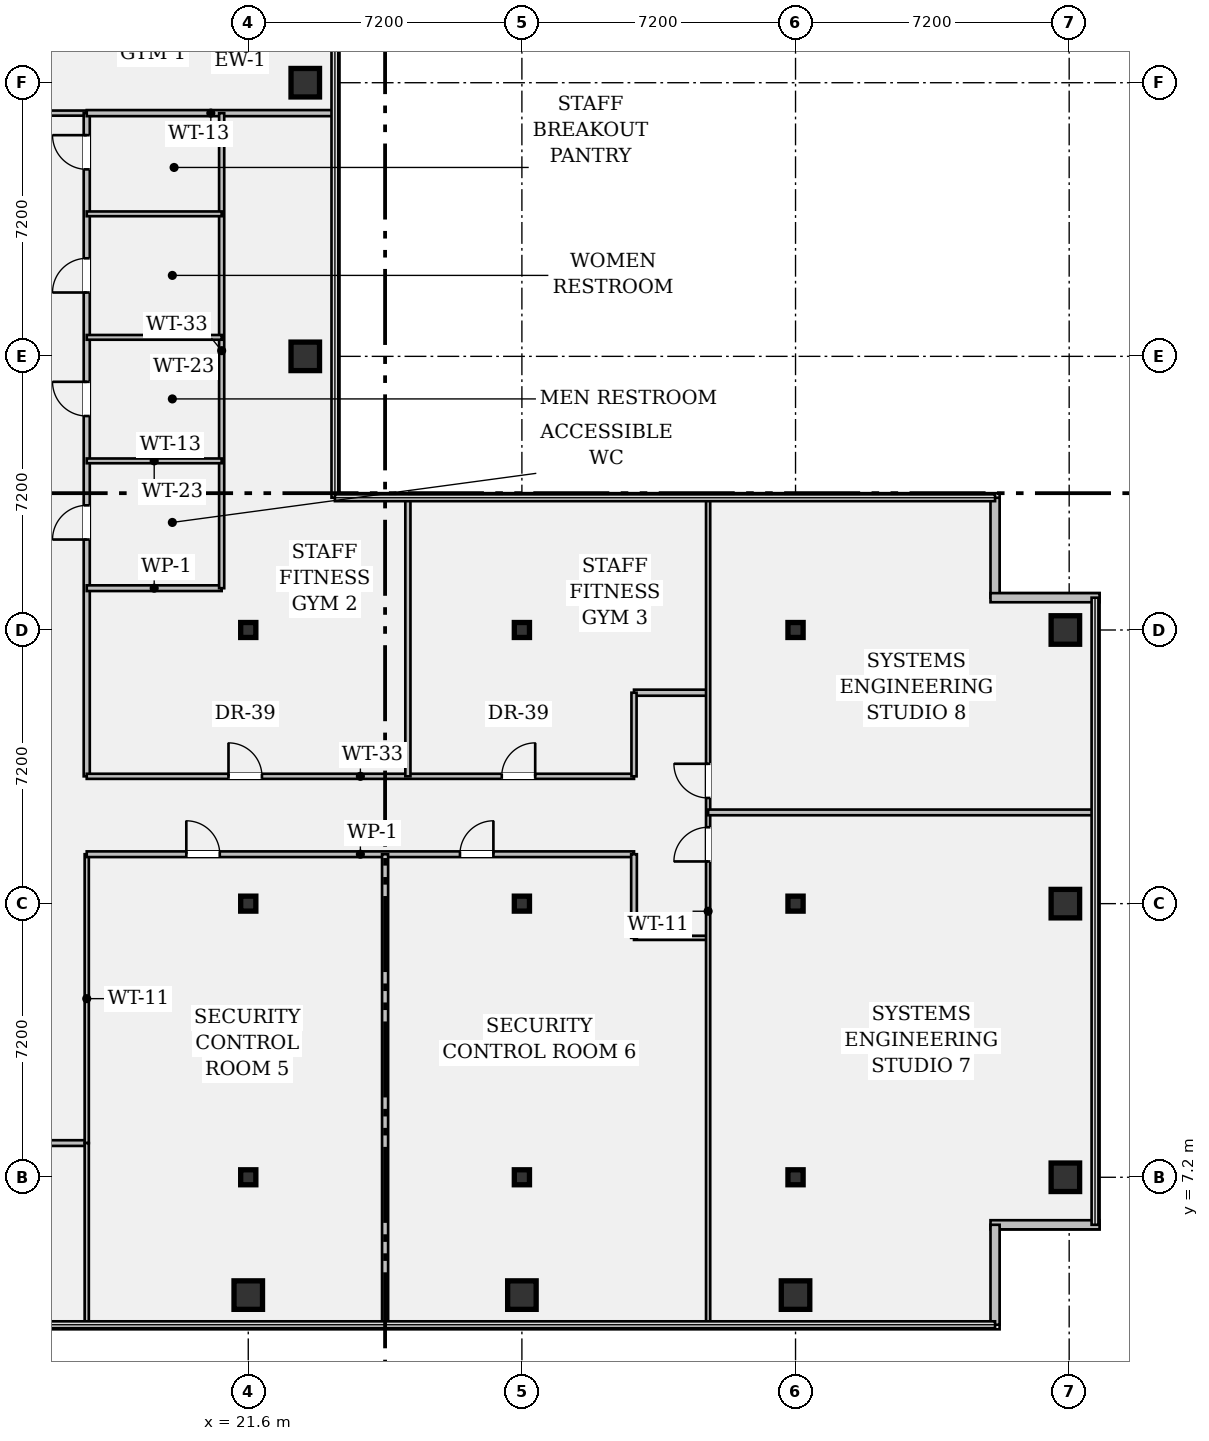
"""IFC4 building model, lengths in metres.
Left out: names, types, materials, properties, quantities, classifications, styles, units other than length and angle.
Written with IfcOpenShell. Run it as: python <this file> out.ifc"""

import sys

from ifc_helpers import new_model, si_unit, direction, frame, frame_2d, origin, origin_2d, place, context, subcontext, project, spatial, rectangle, hollow_rectangle, i_section, extrude, element, fill, save


model = new_model("IFC4")
c1 = context("Model", 3, precision=1e-05, world=origin(), true_north=direction((0.0, 1.0)))
c2 = subcontext(c1, "Body", "Model", "MODEL_VIEW")
j1 = project(units=[si_unit("LENGTHUNIT", "METRE"), si_unit("PLANEANGLEUNIT", "RADIAN")], contexts=[c1])
p1 = place(None, origin())
s1 = spatial("IfcSite", under=j1, at=p1, CompositionType="ELEMENT")
p2 = place(p1, origin())
s2 = spatial("IfcBuilding", under=s1, at=p2, CompositionType="ELEMENT")
p3 = place(p2, frame((0.0, 0.0, 211.75)))
s3 = spatial("IfcBuildingStorey", under=s2, at=p3, CompositionType="ELEMENT", Elevation=211.75)
p4 = place(p3, frame((21.6, 4.1, 0.0), z_axis=(0.0, 0.0, 1.0), x_axis=(1.0, 0.0, 0.0)))
e1 = element("IfcColumn", 1, at=p4, inside=s3, PredefinedType="COLUMN", context=c2, shape_type="SweptSolid", body=[
    extrude(hollow_rectangle(XDim=0.75, YDim=0.75, WallThickness=0.045, at=origin_2d()), origin(), (0.0, 0.0, 1.0), 3.24),
])
for number, where, z_axis, x_axis in (
    (2, (21.6, 7.2, 0.0), (0.0, 0.0, 1.0), (1.0, 0.0, 0.0)),
    (3, (21.6, 14.4, 0.0), (0.0, 0.0, 1.0), (1.0, 0.0, 0.0)),
    (4, (21.6, 21.6, 0.0), (0.0, 0.0, 1.0), (1.0, 0.0, 0.0)),
):
    element("IfcColumn", number, at=place(p3, frame(where, z_axis=z_axis, x_axis=x_axis)), inside=s3, PredefinedType="COLUMN", context=c2, shape_type="SweptSolid", body=[
        extrude(i_section(OverallWidth=0.399, OverallDepth=0.394, WebThickness=0.023, FlangeThickness=0.037, FilletRadius=0.018, at=origin_2d()), origin(), (0.0, 0.0, 1.0), 3.24),
    ])
for number, where, z_axis, x_axis in (
    (5, (23.1, 28.8, 0.0), (0.0, 0.0, 1.0), (1.0, 0.0, 0.0)),
    (6, (23.1, 36.0, 0.0), (0.0, 0.0, 1.0), (1.0, 0.0, 0.0)),
    (7, (28.8, 4.1, 0.0), (0.0, 0.0, 1.0), (1.0, 0.0, 0.0)),
):
    element("IfcColumn", number, at=place(p3, frame(where, z_axis=z_axis, x_axis=x_axis)), inside=s3, PredefinedType="COLUMN", context=c2, shape_type="SweptSolid", body=[
        extrude(hollow_rectangle(XDim=0.75, YDim=0.75, WallThickness=0.045, at=origin_2d()), origin(), (0.0, 0.0, 1.0), 3.24),
    ])
for number, where, z_axis, x_axis in (
    (8, (28.8, 7.2, 0.0), (0.0, 0.0, 1.0), (1.0, 0.0, 0.0)),
    (9, (28.8, 14.4, 0.0), (0.0, 0.0, 1.0), (1.0, 0.0, 0.0)),
    (10, (28.8, 21.6, 0.0), (0.0, 0.0, 1.0), (1.0, 0.0, 0.0)),
):
    element("IfcColumn", number, at=place(p3, frame(where, z_axis=z_axis, x_axis=x_axis)), inside=s3, PredefinedType="COLUMN", context=c2, shape_type="SweptSolid", body=[
        extrude(i_section(OverallWidth=0.399, OverallDepth=0.394, WebThickness=0.023, FlangeThickness=0.037, FilletRadius=0.018, at=origin_2d()), origin(), (0.0, 0.0, 1.0), 3.24),
    ])
p5 = place(p3, frame((36.0, 4.1, 0.0), z_axis=(0.0, 0.0, 1.0), x_axis=(1.0, 0.0, 0.0)))
e11 = element("IfcColumn", 11, at=p5, inside=s3, PredefinedType="COLUMN", context=c2, shape_type="SweptSolid", body=[
    extrude(hollow_rectangle(XDim=0.75, YDim=0.75, WallThickness=0.045, at=origin_2d()), origin(), (0.0, 0.0, 1.0), 3.24),
])
for number, where, z_axis, x_axis in (
    (12, (36.0, 7.2, 0.0), (0.0, 0.0, 1.0), (1.0, 0.0, 0.0)),
    (13, (36.0, 14.4, 0.0), (0.0, 0.0, 1.0), (1.0, 0.0, 0.0)),
    (14, (36.0, 21.6, 0.0), (0.0, 0.0, 1.0), (1.0, 0.0, 0.0)),
):
    element("IfcColumn", number, at=place(p3, frame(where, z_axis=z_axis, x_axis=x_axis)), inside=s3, PredefinedType="COLUMN", context=c2, shape_type="SweptSolid", body=[
        extrude(i_section(OverallWidth=0.399, OverallDepth=0.394, WebThickness=0.023, FlangeThickness=0.037, FilletRadius=0.018, at=origin_2d()), origin(), (0.0, 0.0, 1.0), 3.24),
    ])
for number, where, z_axis, x_axis in (
    (15, (43.1, 7.2, 0.0), (0.0, 0.0, 1.0), (1.0, 0.0, 0.0)),
    (16, (43.1, 14.4, 0.0), (0.0, 0.0, 1.0), (1.0, 0.0, 0.0)),
    (17, (43.1, 21.6, 0.0), (0.0, 0.0, 1.0), (1.0, 0.0, 0.0)),
):
    element("IfcColumn", number, at=place(p3, frame(where, z_axis=z_axis, x_axis=x_axis)), inside=s3, PredefinedType="COLUMN", context=c2, shape_type="SweptSolid", body=[
        extrude(hollow_rectangle(XDim=0.75, YDim=0.75, WallThickness=0.045, at=origin_2d()), origin(), (0.0, 0.0, 1.0), 3.24),
    ])
p6 = place(p3, frame((41.25, 25.08, 0.0), z_axis=(0.0, 0.0, 1.0), x_axis=(0.0, -1.0, 0.0)))
e18 = element("IfcWall", 18, at=p6, inside=s3, PredefinedType="STANDARD", context=c2, shape_type="SweptSolid", body=[
    extrude(rectangle(XDim=2.63, YDim=0.24, at=frame_2d((1.315, 0.0))), origin(), (0.0, 0.0, 1.0), 3.24),
])
for number, where, z_axis, x_axis in (
    (19, (41.13, 22.45, 0.0), (0.0, 0.0, 1.0), (1.0, 0.0, 0.0)),
    (20, (44.0, 5.95, 0.0), (0.0, 0.0, 1.0), (-1.0, 0.0, 0.0)),
):
    element("IfcWall", number, at=place(p3, frame(where, z_axis=z_axis, x_axis=x_axis)), inside=s3, PredefinedType="STANDARD", context=c2, shape_type="SweptSolid", body=[
        extrude(rectangle(XDim=2.87, YDim=0.24, at=frame_2d((1.435, 0.0))), origin(), (0.0, 0.0, 1.0), 3.24),
    ])
p7 = place(p3, frame((41.25, 5.95, 0.0), z_axis=(0.0, 0.0, 1.0), x_axis=(0.0, -1.0, 0.0)))
e21 = element("IfcWall", 21, at=p7, inside=s3, PredefinedType="STANDARD", context=c2, shape_type="SweptSolid", body=[
    extrude(rectangle(XDim=2.63, YDim=0.24, at=frame_2d((1.315, 0.0))), origin(), (0.0, 0.0, 1.0), 3.24),
])
p8 = place(p3, frame((14.4, 8.1, 0.0), z_axis=(0.0, 0.0, 1.0), x_axis=(1.0, 0.0, 0.0)))
e22 = element("IfcWall", 22, at=p8, inside=s3, PredefinedType="PARTITIONING", context=c2, shape_type="SweptSolid", body=[
    extrude(rectangle(XDim=2.95, YDim=0.15, at=frame_2d((1.475, 0.0))), origin(), (0.0, 0.0, 1.0), 2.808),
])
p9 = place(p8, frame((0.95, 0.0, 0.0)))
e23 = element("IfcOpeningElement", 23, at=p9, cuts=e22, PredefinedType="OPENING", context=c2, shape_type="SweptSolid", body=[
    extrude(rectangle(XDim=0.88, YDim=2.15, at=frame_2d((0.44, 1.075))), frame((0.0, 0.087, 0.0), z_axis=(0.0, -1.0, 0.0), x_axis=(1.0, 0.0, 0.0)), (0.0, 0.0, 1.0), 0.174),
])
p10 = place(p3, frame((14.4, 35.2, 0.0), z_axis=(0.0, 0.0, 1.0), x_axis=(1.0, 0.0, 0.0)))
e24 = element("IfcWall", 24, at=p10, inside=s3, PredefinedType="PARTITIONING", context=c2, shape_type="SweptSolid", body=[
    extrude(rectangle(XDim=2.95, YDim=0.135, at=frame_2d((1.475, 0.0))), origin(), (0.0, 0.0, 1.0), 2.808),
])
p11 = place(p10, frame((0.95, 0.0, 0.0)))
e25 = element("IfcOpeningElement", 25, at=p11, cuts=e24, PredefinedType="OPENING", context=c2, shape_type="SweptSolid", body=[
    extrude(rectangle(XDim=1.0, YDim=2.15, at=frame_2d((0.5, 1.075))), frame((0.0, 0.08, 0.0), z_axis=(0.0, -1.0, 0.0), x_axis=(1.0, 0.0, 0.0)), (0.0, 0.0, 1.0), 0.159),
])
p12 = place(p3, frame((17.35, 8.1, 0.0), z_axis=(0.0, 0.0, 1.0), x_axis=(0.0, 1.0, 0.0)))
e26 = element("IfcWall", 26, at=p12, inside=s3, PredefinedType="PARTITIONING", context=c2, shape_type="SweptSolid", body=[
    extrude(rectangle(XDim=7.6, YDim=0.11, at=frame_2d((3.8, 0.0))), origin(), (0.0, 0.0, 1.0), 2.613),
])
p13 = place(p3, frame((17.35, 17.75, 0.0), z_axis=(0.0, 0.0, 1.0), x_axis=(0.0, 1.0, 0.0)))
e27 = element("IfcWall", 27, at=p13, inside=s3, PredefinedType="PARTITIONING", context=c2, shape_type="SweptSolid", body=[
    extrude(rectangle(XDim=17.45, YDim=0.16, at=frame_2d((8.725, 0.0))), origin(), (0.0, 0.0, 1.0), 2.613),
])
p14 = place(p13, frame((6.23, 0.0, 0.0)))
e28 = element("IfcOpeningElement", 28, at=p14, cuts=e27, PredefinedType="OPENING", context=c2, shape_type="SweptSolid", body=[
    extrude(rectangle(XDim=0.9, YDim=2.15, at=frame_2d((0.45, 1.075))), frame((0.0, 0.092, 0.0), z_axis=(0.0, -1.0, 0.0), x_axis=(1.0, 0.0, 0.0)), (0.0, 0.0, 1.0), 0.184),
])
p15 = place(p13, frame((9.48, 0.0, 0.0)))
e29 = element("IfcOpeningElement", 29, at=p15, cuts=e27, PredefinedType="OPENING", context=c2, shape_type="SweptSolid", body=[
    extrude(rectangle(XDim=0.9, YDim=2.15, at=frame_2d((0.45, 1.075))), frame((0.0, 0.092, 0.0), z_axis=(0.0, -1.0, 0.0), x_axis=(1.0, 0.0, 0.0)), (0.0, 0.0, 1.0), 0.184),
])
p16 = place(p13, frame((12.73, 0.0, 0.0)))
e30 = element("IfcOpeningElement", 30, at=p16, cuts=e27, PredefinedType="OPENING", context=c2, shape_type="SweptSolid", body=[
    extrude(rectangle(XDim=0.9, YDim=2.15, at=frame_2d((0.45, 1.075))), frame((0.0, 0.092, 0.0), z_axis=(0.0, -1.0, 0.0), x_axis=(1.0, 0.0, 0.0)), (0.0, 0.0, 1.0), 0.184),
])
p17 = place(p13, frame((15.97, 0.0, 0.0)))
e31 = element("IfcOpeningElement", 31, at=p17, cuts=e27, PredefinedType="OPENING", context=c2, shape_type="SweptSolid", body=[
    extrude(rectangle(XDim=0.9, YDim=2.15, at=frame_2d((0.45, 1.075))), frame((0.0, 0.092, 0.0), z_axis=(0.0, -1.0, 0.0), x_axis=(1.0, 0.0, 0.0)), (0.0, 0.0, 1.0), 0.184),
])
p18 = place(p3, frame((17.35, 15.7, 0.0), z_axis=(0.0, 0.0, 1.0), x_axis=(1.0, 0.0, 0.0)))
e32 = element("IfcWall", 32, at=p18, inside=s3, PredefinedType="PARTITIONING", context=c2, shape_type="SweptSolid", body=[
    extrude(rectangle(XDim=14.4, YDim=0.15, at=frame_2d((7.2, 0.0))), origin(), (0.0, 0.0, 1.0), 2.613),
])
p19 = place(p18, frame((2.62, 0.0, 0.0)))
e33 = element("IfcOpeningElement", 33, at=p19, cuts=e32, PredefinedType="OPENING", context=c2, shape_type="SweptSolid", body=[
    extrude(rectangle(XDim=0.88, YDim=2.15, at=frame_2d((0.44, 1.075))), frame((0.0, 0.087, 0.0), z_axis=(0.0, -1.0, 0.0), x_axis=(1.0, 0.0, 0.0)), (0.0, 0.0, 1.0), 0.174),
])
p20 = place(p18, frame((9.82, 0.0, 0.0)))
e34 = element("IfcOpeningElement", 34, at=p20, cuts=e32, PredefinedType="OPENING", context=c2, shape_type="SweptSolid", body=[
    extrude(rectangle(XDim=0.88, YDim=2.15, at=frame_2d((0.44, 1.075))), frame((0.0, 0.087, 0.0), z_axis=(0.0, -1.0, 0.0), x_axis=(1.0, 0.0, 0.0)), (0.0, 0.0, 1.0), 0.174),
])
p21 = place(p3, frame((17.35, 17.75, 0.0), z_axis=(0.0, 0.0, 1.0), x_axis=(1.0, 0.0, 0.0)))
e35 = element("IfcWall", 35, at=p21, inside=s3, PredefinedType="PARTITIONING", context=c2, shape_type="SweptSolid", body=[
    extrude(rectangle(XDim=14.4, YDim=0.135, at=frame_2d((7.2, 0.0))), origin(), (0.0, 0.0, 1.0), 2.613),
])
p22 = place(p21, frame((3.73, 0.0, 0.0)))
e36 = element("IfcOpeningElement", 36, at=p22, cuts=e35, PredefinedType="OPENING", context=c2, shape_type="SweptSolid", body=[
    extrude(rectangle(XDim=0.88, YDim=2.15, at=frame_2d((0.44, 1.075))), frame((0.0, 0.08, 0.0), z_axis=(0.0, -1.0, 0.0), x_axis=(1.0, 0.0, 0.0)), (0.0, 0.0, 1.0), 0.159),
])
p23 = place(p21, frame((10.92, 0.0, 0.0)))
e37 = element("IfcOpeningElement", 37, at=p23, cuts=e35, PredefinedType="OPENING", context=c2, shape_type="SweptSolid", body=[
    extrude(rectangle(XDim=0.88, YDim=2.15, at=frame_2d((0.44, 1.075))), frame((0.0, 0.08, 0.0), z_axis=(0.0, -1.0, 0.0), x_axis=(1.0, 0.0, 0.0)), (0.0, 0.0, 1.0), 0.159),
])
p24 = place(p3, frame((31.75, 13.5, 0.0), z_axis=(0.0, 0.0, 1.0), x_axis=(1.0, 0.0, 0.0)))
e38 = element("IfcWall", 38, at=p24, inside=s3, PredefinedType="PARTITIONING", context=c2, shape_type="SweptSolid", body=[
    extrude(rectangle(XDim=1.95, YDim=0.11, at=frame_2d((0.975, 0.0))), origin(), (0.0, 0.0, 1.0), 2.808),
])
p25 = place(p3, frame((31.75, 19.95, 0.0), z_axis=(0.0, 0.0, 1.0), x_axis=(1.0, 0.0, 0.0)))
e39 = element("IfcWall", 39, at=p25, inside=s3, PredefinedType="PARTITIONING", context=c2, shape_type="SweptSolid", body=[
    extrude(rectangle(XDim=1.95, YDim=0.16, at=frame_2d((0.975, 0.0))), origin(), (0.0, 0.0, 1.0), 2.808),
])
p26 = place(p3, frame((31.75, 13.5, 0.0), z_axis=(0.0, 0.0, 1.0), x_axis=(0.0, 1.0, 0.0)))
e40 = element("IfcWall", 40, at=p26, inside=s3, PredefinedType="PARTITIONING", context=c2, shape_type="SweptSolid", body=[
    extrude(rectangle(XDim=2.2, YDim=0.15, at=frame_2d((1.1, 0.0))), origin(), (0.0, 0.0, 1.0), 2.613),
])
p27 = place(p3, frame((31.75, 17.75, 0.0), z_axis=(0.0, 0.0, 1.0), x_axis=(0.0, 1.0, 0.0)))
e41 = element("IfcWall", 41, at=p27, inside=s3, PredefinedType="PARTITIONING", context=c2, shape_type="SweptSolid", body=[
    extrude(rectangle(XDim=2.2, YDim=0.135, at=frame_2d((1.1, 0.0))), origin(), (0.0, 0.0, 1.0), 3.24),
])
p28 = place(p3, frame((33.7, 3.32, 0.0), z_axis=(0.0, 0.0, 1.0), x_axis=(0.0, 1.0, 0.0)))
e42 = element("IfcWall", 42, at=p28, inside=s3, PredefinedType="PARTITIONING", context=c2, shape_type="SweptSolid", body=[
    extrude(rectangle(XDim=21.76, YDim=0.11, at=frame_2d((10.88, 0.0))), origin(), (0.0, 0.0, 1.0), 2.613),
])
p29 = place(p28, frame((12.19, 0.0, 0.0)))
e43 = element("IfcOpeningElement", 43, at=p29, cuts=e42, PredefinedType="OPENING", context=c2, shape_type="SweptSolid", body=[
    extrude(rectangle(XDim=0.9, YDim=2.15, at=frame_2d((0.45, 1.075))), frame((0.0, 0.067, 0.0), z_axis=(0.0, -1.0, 0.0), x_axis=(1.0, 0.0, 0.0)), (0.0, 0.0, 1.0), 0.134),
])
p30 = place(p28, frame((13.86, 0.0, 0.0)))
e44 = element("IfcOpeningElement", 44, at=p30, cuts=e42, PredefinedType="OPENING", context=c2, shape_type="SweptSolid", body=[
    extrude(rectangle(XDim=0.9, YDim=2.15, at=frame_2d((0.45, 1.075))), frame((0.0, 0.067, 0.0), z_axis=(0.0, -1.0, 0.0), x_axis=(1.0, 0.0, 0.0)), (0.0, 0.0, 1.0), 0.134),
])
p31 = place(p3, frame((17.35, 35.2, 0.0), z_axis=(0.0, 0.0, 1.0), x_axis=(1.0, 0.0, 0.0)))
e45 = element("IfcWall", 45, at=p31, inside=s3, PredefinedType="PARTITIONING", context=c2, shape_type="SweptSolid", body=[
    extrude(rectangle(XDim=6.53, YDim=0.16, at=frame_2d((3.265, 0.0))), origin(), (0.0, 0.0, 1.0), 2.758),
])
p32 = place(p3, frame((17.35, 22.7, 0.0), z_axis=(0.0, 0.0, 1.0), x_axis=(1.0, 0.0, 0.0)))
e46 = element("IfcWall", 46, at=p32, inside=s3, PredefinedType="PARTITIONING", context=c2, shape_type="SweptSolid", body=[
    extrude(rectangle(XDim=3.55, YDim=0.15, at=frame_2d((1.775, 0.0))), origin(), (0.0, 0.0, 1.0), 2.808),
])
p33 = place(p3, frame((20.9, 22.7, 0.0), z_axis=(0.0, 0.0, 1.0), x_axis=(0.0, 1.0, 0.0)))
e47 = element("IfcWall", 47, at=p33, inside=s3, PredefinedType="PARTITIONING", context=c2, shape_type="SweptSolid", body=[
    extrude(rectangle(XDim=12.5, YDim=0.135, at=frame_2d((6.25, 0.0))), origin(), (0.0, 0.0, 1.0), 2.613),
])
for number, where, z_axis, x_axis in (
    (48, (17.35, 26.05, 0.0), (0.0, 0.0, 1.0), (1.0, 0.0, 0.0)),
    (49, (17.35, 29.3, 0.0), (0.0, 0.0, 1.0), (1.0, 0.0, 0.0)),
    (50, (17.35, 32.55, 0.0), (0.0, 0.0, 1.0), (1.0, 0.0, 0.0)),
):
    element("IfcWall", number, at=place(p3, frame(where, z_axis=z_axis, x_axis=x_axis)), inside=s3, PredefinedType="PARTITIONING", context=c2, shape_type="SweptSolid", body=[
        extrude(rectangle(XDim=3.55, YDim=0.125, at=frame_2d((1.775, 0.0))), origin(), (0.0, 0.0, 1.0), 2.808),
    ])
p34 = place(p3, frame((25.8, 17.75, 0.0), z_axis=(0.0, 0.0, 1.0), x_axis=(0.0, 1.0, 0.0)))
e51 = element("IfcWall", 51, at=p34, inside=s3, PredefinedType="PARTITIONING", context=c2, shape_type="SweptSolid", body=[
    extrude(rectangle(XDim=7.3, YDim=0.135, at=frame_2d((3.65, 0.0))), origin(), (0.0, 0.0, 1.0), 2.613),
])
p35 = place(p3, frame((17.35, 3.32, 0.0), z_axis=(0.0, 0.0, 1.0), x_axis=(0.0, 1.0, 0.0)))
e52 = element("IfcWall", 52, at=p35, inside=s3, PredefinedType="PARTITIONING", context=c2, shape_type="SweptSolid", body=[
    extrude(rectangle(XDim=4.78, YDim=0.11, at=frame_2d((2.39, 0.0))), origin(), (0.0, 0.0, 1.0), 2.613),
])
p36 = place(p3, frame((25.2, 3.32, 0.0), z_axis=(0.0, 0.0, 1.0), x_axis=(0.0, 1.0, 0.0)))
e53 = element("IfcWall", 53, at=p36, inside=s3, PredefinedType="PARTITIONING", context=c2, shape_type="SweptSolid", body=[
    extrude(rectangle(XDim=12.38, YDim=0.16, at=frame_2d((6.19, 0.0))), origin(), (0.0, 0.0, 1.0), 2.613),
])
p37 = place(p3, frame((33.7, 16.8, 0.0), z_axis=(0.0, 0.0, 1.0), x_axis=(1.0, 0.0, 0.0)))
e54 = element("IfcWall", 54, at=p37, inside=s3, PredefinedType="PARTITIONING", context=c2, shape_type="SweptSolid", body=[
    extrude(rectangle(XDim=10.18, YDim=0.15, at=frame_2d((5.09, 0.0))), origin(), (0.0, 0.0, 1.0), 2.613),
])
p38 = place(p14, origin())
e55 = element("IfcDoor", 55, at=p38, inside=s3, OperationType="SINGLE_SWING_LEFT", PredefinedType="DOOR", context=c2, shape_type="SweptSolid", body=[
    extrude(rectangle(XDim=0.9, YDim=2.15, at=frame_2d((0.45, 1.075))), frame((0.0, 0.025, 0.0), z_axis=(0.0, -1.0, 0.0), x_axis=(1.0, 0.0, 0.0)), (0.0, 0.0, 1.0), 0.05),
])
fill(e28, e55)
p39 = place(p15, origin())
e56 = element("IfcDoor", 56, at=p39, inside=s3, OperationType="SINGLE_SWING_RIGHT", PredefinedType="DOOR", context=c2, shape_type="SweptSolid", body=[
    extrude(rectangle(XDim=0.9, YDim=2.15, at=frame_2d((0.45, 1.075))), frame((0.0, 0.025, 0.0), z_axis=(0.0, -1.0, 0.0), x_axis=(1.0, 0.0, 0.0)), (0.0, 0.0, 1.0), 0.05),
])
fill(e29, e56)
p40 = place(p16, origin())
e57 = element("IfcDoor", 57, at=p40, inside=s3, OperationType="SINGLE_SWING_LEFT", PredefinedType="DOOR", context=c2, shape_type="SweptSolid", body=[
    extrude(rectangle(XDim=0.9, YDim=2.15, at=frame_2d((0.45, 1.075))), frame((0.0, 0.025, 0.0), z_axis=(0.0, -1.0, 0.0), x_axis=(1.0, 0.0, 0.0)), (0.0, 0.0, 1.0), 0.05),
])
fill(e30, e57)
p41 = place(p17, origin())
e58 = element("IfcDoor", 58, at=p41, inside=s3, OperationType="SINGLE_SWING_RIGHT", PredefinedType="DOOR", context=c2, shape_type="SweptSolid", body=[
    extrude(rectangle(XDim=0.9, YDim=2.15, at=frame_2d((0.45, 1.075))), frame((0.0, 0.025, 0.0), z_axis=(0.0, -1.0, 0.0), x_axis=(1.0, 0.0, 0.0)), (0.0, 0.0, 1.0), 0.05),
])
fill(e31, e58)
p42 = place(p22, origin())
e59 = element("IfcDoor", 59, at=p42, inside=s3, OperationType="SINGLE_SWING_LEFT", PredefinedType="DOOR", context=c2, shape_type="SweptSolid", body=[
    extrude(rectangle(XDim=0.88, YDim=2.15, at=frame_2d((0.44, 1.075))), frame((0.0, 0.025, 0.0), z_axis=(0.0, -1.0, 0.0), x_axis=(1.0, 0.0, 0.0)), (0.0, 0.0, 1.0), 0.05),
])
fill(e36, e59)
p43 = place(p23, origin())
e60 = element("IfcDoor", 60, at=p43, inside=s3, OperationType="SINGLE_SWING_RIGHT", PredefinedType="DOOR", context=c2, shape_type="SweptSolid", body=[
    extrude(rectangle(XDim=0.88, YDim=2.15, at=frame_2d((0.44, 1.075))), frame((0.0, 0.025, 0.0), z_axis=(0.0, -1.0, 0.0), x_axis=(1.0, 0.0, 0.0)), (0.0, 0.0, 1.0), 0.05),
])
fill(e37, e60)
p44 = place(p19, origin())
e61 = element("IfcDoor", 61, at=p44, inside=s3, OperationType="SINGLE_SWING_LEFT", PredefinedType="DOOR", context=c2, shape_type="SweptSolid", body=[
    extrude(rectangle(XDim=0.88, YDim=2.15, at=frame_2d((0.44, 1.075))), frame((0.0, 0.025, 0.0), z_axis=(0.0, -1.0, 0.0), x_axis=(1.0, 0.0, 0.0)), (0.0, 0.0, 1.0), 0.05),
])
fill(e33, e61)
p45 = place(p20, origin())
e62 = element("IfcDoor", 62, at=p45, inside=s3, OperationType="SINGLE_SWING_RIGHT", PredefinedType="DOOR", context=c2, shape_type="SweptSolid", body=[
    extrude(rectangle(XDim=0.88, YDim=2.15, at=frame_2d((0.44, 1.075))), frame((0.0, 0.025, 0.0), z_axis=(0.0, -1.0, 0.0), x_axis=(1.0, 0.0, 0.0)), (0.0, 0.0, 1.0), 0.05),
])
fill(e34, e62)
p46 = place(p29, origin())
e63 = element("IfcDoor", 63, at=p46, inside=s3, OperationType="SINGLE_SWING_LEFT", PredefinedType="DOOR", context=c2, shape_type="SweptSolid", body=[
    extrude(rectangle(XDim=0.9, YDim=2.15, at=frame_2d((0.45, 1.075))), frame((0.0, 0.025, 0.0), z_axis=(0.0, -1.0, 0.0), x_axis=(1.0, 0.0, 0.0)), (0.0, 0.0, 1.0), 0.05),
])
fill(e43, e63)
p47 = place(p30, origin())
e64 = element("IfcDoor", 64, at=p47, inside=s3, OperationType="SINGLE_SWING_RIGHT", PredefinedType="DOOR", context=c2, shape_type="SweptSolid", body=[
    extrude(rectangle(XDim=0.9, YDim=2.15, at=frame_2d((0.45, 1.075))), frame((0.0, 0.025, 0.0), z_axis=(0.0, -1.0, 0.0), x_axis=(1.0, 0.0, 0.0)), (0.0, 0.0, 1.0), 0.05),
])
fill(e44, e64)
save(model, sys.argv[1])
